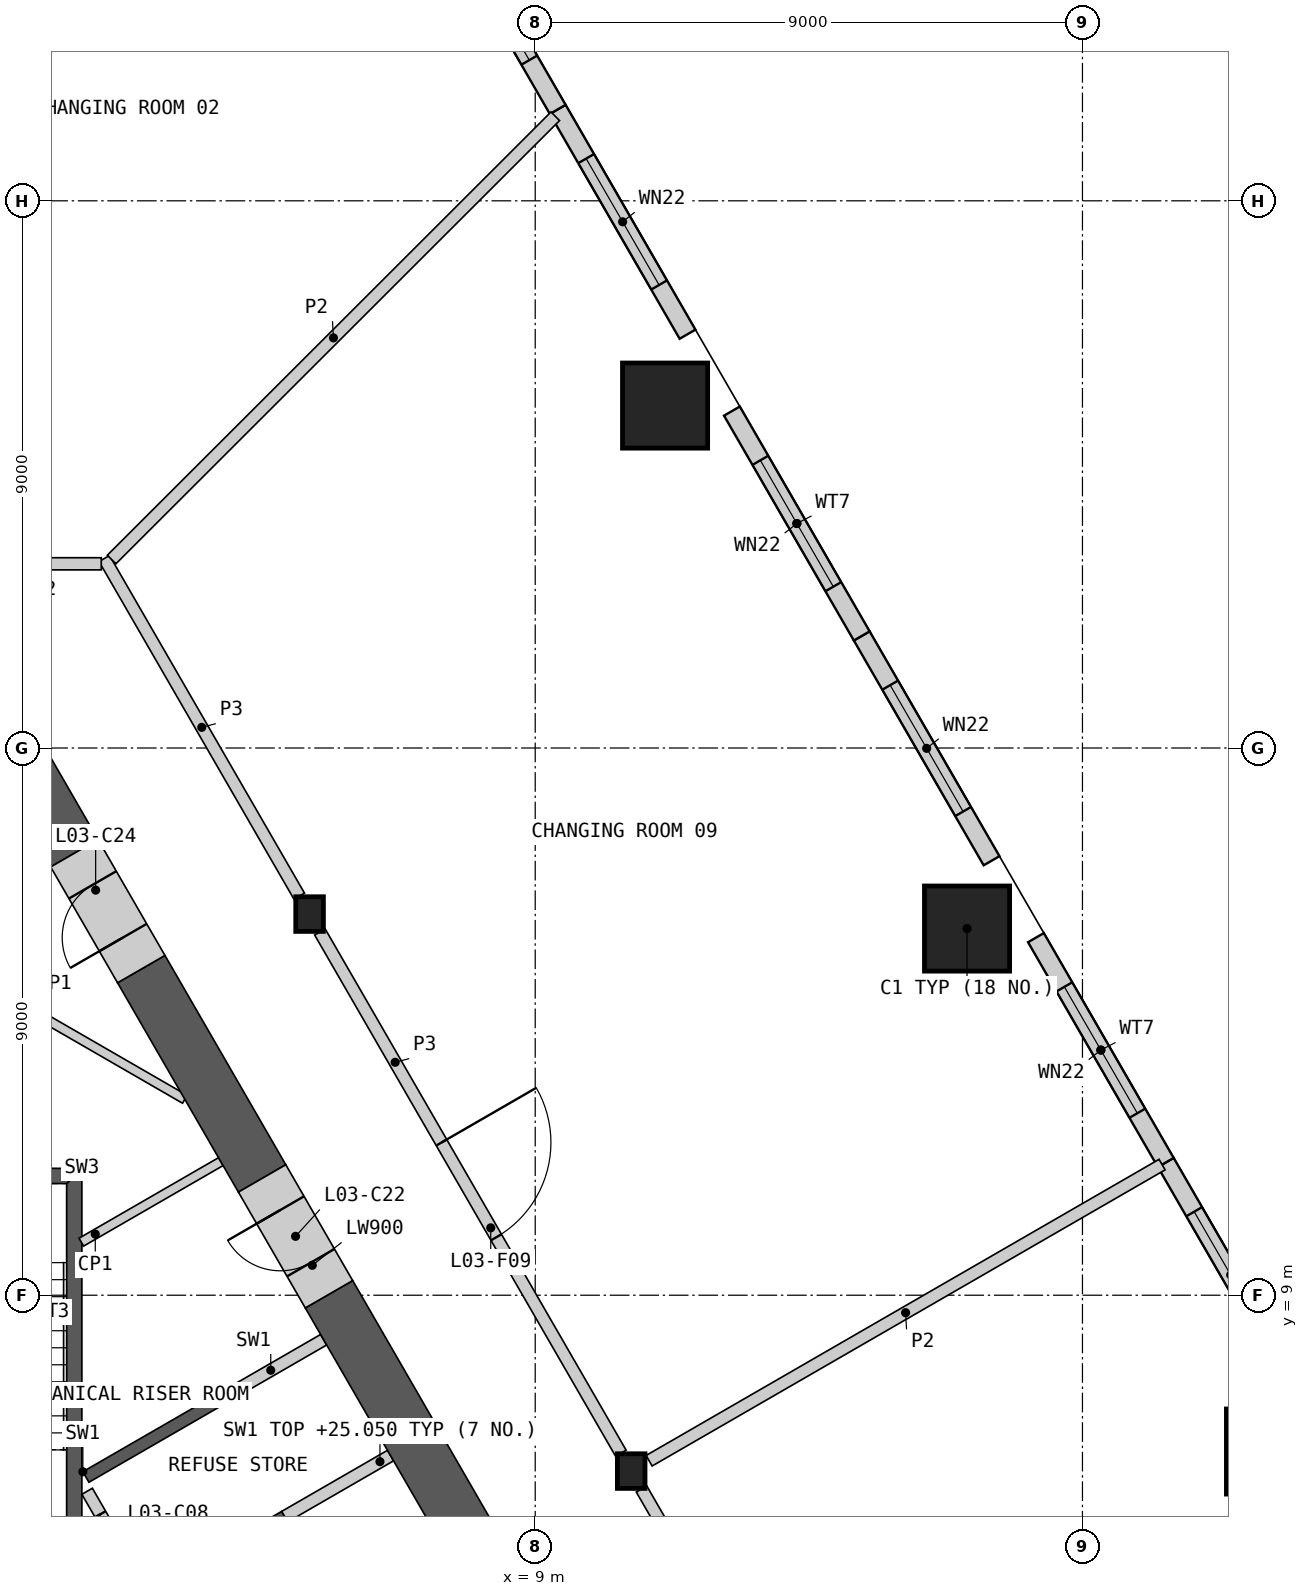
"""IFC4 building model, lengths in metres.
Left out: names, types, materials, properties, quantities, classifications, styles, units other than length and angle.
Written with IfcOpenShell. Run it as: python <this file> out.ifc"""

import sys

from ifc_helpers import new_model, si_unit, direction, frame, frame_2d, origin, origin_2d, place, context, subcontext, project, spatial, polyline, rectangle, hollow_rectangle, i_section, outline, extrude, element, fill, save


model = new_model("IFC4")
c1 = context("Model", 3, precision=1e-05, world=origin(), true_north=direction((0.0, 1.0)))
c2 = subcontext(c1, "Body", "Model", "MODEL_VIEW")
j1 = project(units=[si_unit("LENGTHUNIT", "METRE"), si_unit("PLANEANGLEUNIT", "RADIAN")], contexts=[c1])
p1 = place(None, origin())
s1 = spatial("IfcSite", under=j1, at=p1, CompositionType="ELEMENT")
p2 = place(p1, origin())
s2 = spatial("IfcBuilding", under=s1, at=p2, CompositionType="ELEMENT")
p3 = place(p2, frame((0.0, 0.0, 21.0)))
s3 = spatial("IfcBuildingStorey", under=s2, at=p3, CompositionType="ELEMENT", Elevation=21.0)
for number, where, z_axis, x_axis in (
    (1, (21.068, 6.429, 0.0), (0.0, 0.0, 1.0), (1.0, 0.0, 0.0)),
    (2, (16.102, 15.031, 0.0), (0.0, 0.0, 1.0), (1.0, 0.0, 0.0)),
    (3, (11.136, 23.632, 0.0), (0.0, 0.0, 1.0), (1.0, 0.0, 0.0)),
):
    element("IfcColumn", number, at=place(p3, frame(where, z_axis=z_axis, x_axis=x_axis)), inside=s3, PredefinedType="COLUMN", context=c2, shape_type="SweptSolid", body=[
        extrude(hollow_rectangle(XDim=1.4, YDim=1.4, WallThickness=0.1, at=origin_2d()), origin(), (0.0, 0.0, 1.0), 4.5),
    ])
for number, where, z_axis, x_axis in (
    (4, (10.578, 6.107, 0.0), (0.0, 0.0, 1.0), (1.0, 0.0, 0.0)),
    (5, (5.289, 15.269, 0.0), (0.0, 0.0, 1.0), (1.0, 0.0, 0.0)),
):
    element("IfcColumn", number, at=place(p3, frame(where, z_axis=z_axis, x_axis=x_axis)), inside=s3, PredefinedType="COLUMN", context=c2, shape_type="SweptSolid", body=[
        extrude(i_section(OverallWidth=0.454, OverallDepth=0.57, WebThickness=0.078, FlangeThickness=0.125, at=origin_2d()), origin(), (0.0, 0.0, 1.0), 4.5),
    ])
p4 = place(p3, frame((21.676, 7.189, 0.0), z_axis=(0.0, 0.0, 1.0), x_axis=(-0.499982117899, 0.866035727774, 0.0)))
e6 = element("IfcWall", 6, at=p4, inside=s3, PredefinedType="SOLIDWALL", context=c2, shape_type="SweptSolid", body=[
    extrude(rectangle(XDim=4.612, YDim=0.3, at=frame_2d((2.306, 0.0))), origin(), (0.0, 0.0, 1.0), 4.05),
])
p5 = place(p4, frame((1.277, 0.0, 0.9)))
e7 = element("IfcOpeningElement", 7, at=p5, cuts=e6, PredefinedType="OPENING", context=c2, shape_type="SweptSolid", body=[
    extrude(rectangle(XDim=2.4, YDim=2.55, at=frame_2d((1.2, 1.275))), frame((0.0, 0.16, 0.0), z_axis=(0.0, -1.0, 0.0), x_axis=(1.0, 0.0, 0.0)), (0.0, 0.0, 1.0), 0.32),
])
p6 = place(p3, frame((19.37, 11.183, 0.0), z_axis=(0.0, 0.0, 1.0), x_axis=(-0.499994660107, 0.866028486751, 0.0)))
e8 = element("IfcWall", 8, at=p6, inside=s3, PredefinedType="SOLIDWALL", context=c2, shape_type="SweptSolid", body=[
    extrude(rectangle(XDim=4.27, YDim=0.3, at=frame_2d((2.135, 0.0))), origin(), (0.0, 0.0, 1.0), 4.05),
])
p7 = place(p6, frame((0.935, 0.0, 0.9)))
e9 = element("IfcOpeningElement", 9, at=p7, cuts=e8, PredefinedType="OPENING", context=c2, shape_type="SweptSolid", body=[
    extrude(rectangle(XDim=2.4, YDim=2.55, at=frame_2d((1.2, 1.275))), frame((0.0, 0.16, 0.0), z_axis=(0.0, -1.0, 0.0), x_axis=(1.0, 0.0, 0.0)), (0.0, 0.0, 1.0), 0.32),
])
p8 = place(p3, frame((16.505, 16.146, 0.0), z_axis=(0.0, 0.0, 1.0), x_axis=(-0.500019418418, 0.866014192265, 0.0)))
e10 = element("IfcWall", 10, at=p8, inside=s3, PredefinedType="SOLIDWALL", context=c2, shape_type="SweptSolid", body=[
    extrude(rectangle(XDim=4.27, YDim=0.3, at=frame_2d((2.135, 0.0))), origin(), (0.0, 0.0, 1.0), 4.05),
])
p9 = place(p8, frame((0.935, 0.0, 0.9)))
e11 = element("IfcOpeningElement", 11, at=p9, cuts=e10, PredefinedType="OPENING", context=c2, shape_type="SweptSolid", body=[
    extrude(rectangle(XDim=2.4, YDim=2.55, at=frame_2d((1.2, 1.275))), frame((0.0, 0.16, 0.0), z_axis=(0.0, -1.0, 0.0), x_axis=(1.0, 0.0, 0.0)), (0.0, 0.0, 1.0), 0.32),
])
p10 = place(p3, frame((14.37, 19.844, 0.0), z_axis=(0.0, 0.0, 1.0), x_axis=(-0.499994660107, 0.866028486751, 0.0)))
e12 = element("IfcWall", 12, at=p10, inside=s3, PredefinedType="SOLIDWALL", context=c2, shape_type="SweptSolid", body=[
    extrude(rectangle(XDim=4.27, YDim=0.3, at=frame_2d((2.135, 0.0))), origin(), (0.0, 0.0, 1.0), 4.05),
])
p11 = place(p10, frame((0.935, 0.0, 0.9)))
e13 = element("IfcOpeningElement", 13, at=p11, cuts=e12, PredefinedType="OPENING", context=c2, shape_type="SweptSolid", body=[
    extrude(rectangle(XDim=2.4, YDim=2.55, at=frame_2d((1.2, 1.275))), frame((0.0, 0.16, 0.0), z_axis=(0.0, -1.0, 0.0), x_axis=(1.0, 0.0, 0.0)), (0.0, 0.0, 1.0), 0.32),
])
p12 = place(p3, frame((11.505, 24.806, 0.0), z_axis=(0.0, 0.0, 1.0), x_axis=(-0.499994660107, 0.866028486751, 0.0)))
e14 = element("IfcWall", 14, at=p12, inside=s3, PredefinedType="SOLIDWALL", context=c2, shape_type="SweptSolid", body=[
    extrude(rectangle(XDim=4.27, YDim=0.3, at=frame_2d((2.135, 0.0))), origin(), (0.0, 0.0, 1.0), 4.05),
])
p13 = place(p12, frame((0.935, 0.0, 0.9)))
e15 = element("IfcOpeningElement", 15, at=p13, cuts=e14, PredefinedType="OPENING", context=c2, shape_type="SweptSolid", body=[
    extrude(rectangle(XDim=2.4, YDim=2.55, at=frame_2d((1.2, 1.275))), frame((0.0, 0.16, 0.0), z_axis=(0.0, -1.0, 0.0), x_axis=(1.0, 0.0, 0.0)), (0.0, 0.0, 1.0), 0.32),
])
p14 = place(p3, frame((9.37, 28.504, 0.0), z_axis=(0.0, 0.0, 1.0), x_axis=(-0.500019418418, 0.866014192265, 0.0)))
e16 = element("IfcWall", 16, at=p14, inside=s3, PredefinedType="SOLIDWALL", context=c2, shape_type="SweptSolid", body=[
    extrude(rectangle(XDim=4.27, YDim=0.3, at=frame_2d((2.135, 0.0))), origin(), (0.0, 0.0, 1.0), 4.05),
])
p15 = place(p14, frame((0.935, 0.0, 0.9)))
e17 = element("IfcOpeningElement", 17, at=p15, cuts=e16, PredefinedType="OPENING", context=c2, shape_type="SweptSolid", body=[
    extrude(rectangle(XDim=2.4, YDim=2.55, at=frame_2d((1.2, 1.275))), frame((0.0, 0.16, 0.0), z_axis=(0.0, -1.0, 0.0), x_axis=(1.0, 0.0, 0.0)), (0.0, 0.0, 1.0), 0.32),
])
p16 = place(p3, origin())
e18 = element("IfcWall", 18, at=p16, inside=s3, PredefinedType="SHEAR", context=c2, shape_type="SweptSolid", body=[
    extrude(outline(polyline([(1.561, 6.097), (3.731, 7.35), (3.831, 7.177), (1.66, 5.924), (1.561, 6.097)])), origin(), (0.0, 0.0, 1.0), 4.05),
])
p17 = place(p3, origin())
e19 = element("IfcWall", 19, at=p17, inside=s3, PredefinedType="SHEAR", context=c2, shape_type="SweptSolid", body=[
    extrude(outline(polyline([(2.66, 4.192), (4.831, 5.445), (8.231, -0.444), (6.061, -1.697), (5.96, -1.524), (7.952, -0.374), (6.952, 1.358), (4.96, 0.208), (4.861, 0.381), (6.852, 1.531), (5.852, 3.263), (3.861, 2.113), (3.76, 2.287), (5.752, 3.437), (4.752, 5.169), (2.76, 4.019), (2.66, 4.192)])), origin(), (0.0, 0.0, 1.0), 4.05),
])
p18 = place(p3, frame((5.817, -1.476, 0.0), z_axis=(0.0, 0.0, 1.0), x_axis=(-0.500002616675, 0.866023893041, 0.0)))
e20 = element("IfcWall", 20, at=p18, inside=s3, PredefinedType="SOLIDWALL", context=c2, shape_type="SweptSolid", body=[
    extrude(rectangle(XDim=8.373, YDim=0.2, at=frame_2d((4.187, 0.0))), origin(), (0.0, 0.0, 1.0), 4.05),
])
p19 = place(p18, frame((0.337, 0.0, 0.0)))
e21 = element("IfcOpeningElement", 21, at=p19, cuts=e20, PredefinedType="OPENING", context=c2, shape_type="SweptSolid", body=[
    extrude(rectangle(XDim=1.1, YDim=2.1, at=frame_2d((0.55, 1.05))), frame((0.0, 0.11, 0.0), z_axis=(0.0, -1.0, 0.0), x_axis=(1.0, 0.0, 0.0)), (0.0, 0.0, 1.0), 0.22),
])
p20 = place(p18, frame((2.537, 0.0, 0.0)))
e22 = element("IfcOpeningElement", 22, at=p20, cuts=e20, PredefinedType="OPENING", context=c2, shape_type="SweptSolid", body=[
    extrude(rectangle(XDim=1.1, YDim=2.1, at=frame_2d((0.55, 1.05))), frame((0.0, 0.11, 0.0), z_axis=(0.0, -1.0, 0.0), x_axis=(1.0, 0.0, 0.0)), (0.0, 0.0, 1.0), 0.22),
])
p21 = place(p18, frame((4.737, 0.0, 0.0)))
e23 = element("IfcOpeningElement", 23, at=p21, cuts=e20, PredefinedType="OPENING", context=c2, shape_type="SweptSolid", body=[
    extrude(rectangle(XDim=1.1, YDim=2.1, at=frame_2d((0.55, 1.05))), frame((0.0, 0.11, 0.0), z_axis=(0.0, -1.0, 0.0), x_axis=(1.0, 0.0, 0.0)), (0.0, 0.0, 1.0), 0.22),
])
p22 = place(p18, frame((7.037, 0.0, 0.0)))
e24 = element("IfcOpeningElement", 24, at=p22, cuts=e20, PredefinedType="OPENING", context=c2, shape_type="SweptSolid", body=[
    extrude(rectangle(XDim=0.9, YDim=2.1, at=frame_2d((0.45, 1.05))), frame((0.0, 0.11, 0.0), z_axis=(0.0, -1.0, 0.0), x_axis=(1.0, 0.0, 0.0)), (0.0, 0.0, 1.0), 0.22),
])
p23 = place(p3, frame((4.881, 5.358, 0.0), z_axis=(0.0, 0.0, 1.0), x_axis=(0.866035824272, 0.499981950752, 0.0)))
e25 = element("IfcWall", 25, at=p23, inside=s3, PredefinedType="SHEAR", context=c2, shape_type="SweptSolid", body=[
    extrude(rectangle(XDim=2.009, YDim=0.2, at=frame_2d((1.004, 0.0))), origin(), (0.0, 0.0, 1.0), 4.05),
])
p24 = place(p3, frame((3.781, 7.263, 0.0), z_axis=(0.0, 0.0, 1.0), x_axis=(0.865983199114, 0.50007309351, 0.0)))
e26 = element("IfcWall", 26, at=p24, inside=s3, PredefinedType="SHEAR", context=c2, shape_type="SweptSolid", body=[
    extrude(rectangle(XDim=2.009, YDim=0.2, at=frame_2d((1.004, 0.0))), origin(), (0.0, 0.0, 1.0), 4.05),
])
p25 = place(p3, origin())
e27 = element("IfcWall", 27, at=p25, inside=s3, PredefinedType="SHEAR", context=c2, shape_type="SweptSolid", body=[
    extrude(outline(polyline([(1.544, 5.237), (1.544, 11.087), (1.294, 10.837), (1.294, 5.237), (1.544, 5.237)])), origin(), (0.0, 0.0, 1.0), 4.05),
])
p26 = place(p3, origin())
e28 = element("IfcWall", 28, at=p26, inside=s3, PredefinedType="SHEAR", context=c2, shape_type="SweptSolid", body=[
    extrude(outline(polyline([(1.544, 11.087), (-1.544, 11.087), (-1.294, 10.837), (1.294, 10.837), (1.544, 11.087)])), origin(), (0.0, 0.0, 1.0), 4.05),
])
p27 = place(p3, frame((3.829, 11.197, 0.0), z_axis=(0.0, 0.0, 1.0), x_axis=(-0.866016748302, -0.500014991436, 0.0)))
e29 = element("IfcWall", 29, at=p27, inside=s3, PredefinedType="PARTITIONING", context=c2, shape_type="SweptSolid", body=[
    extrude(rectangle(XDim=2.649, YDim=0.15, at=frame_2d((1.324, 0.0))), origin(), (0.0, 0.0, 1.0), 4.05),
])
p28 = place(p3, frame((-1.619, 15.026, 0.0), z_axis=(0.0, 0.0, 1.0), x_axis=(0.866015917575, -0.500016430238, 0.0)))
e30 = element("IfcWall", 30, at=p28, inside=s3, PredefinedType="PARTITIONING", context=c2, shape_type="SweptSolid", body=[
    extrude(rectangle(XDim=5.607, YDim=0.15, at=frame_2d((2.804, 0.0))), origin(), (0.0, 0.0, 1.0), 4.05),
])
p29 = place(p3, frame((9.561, 2.169, 0.0), z_axis=(0.0, 0.0, 1.0), x_axis=(-0.499995114243, 0.866028224559, 0.0)))
e31 = element("IfcWall", 31, at=p29, inside=s3, PredefinedType="SHEAR", context=c2, shape_type="SweptSolid", body=[
    extrude(rectangle(XDim=7.906, YDim=0.9, at=frame_2d((3.953, 0.0))), origin(), (0.0, 0.0, 1.0), 4.05),
])
p30 = place(p3, frame((4.509, 10.921, 0.0), z_axis=(0.0, 0.0, 1.0), x_axis=(-0.49999004381, 0.866031151917, 0.0)))
e32 = element("IfcWall", 32, at=p30, inside=s3, PredefinedType="SHEAR", context=c2, shape_type="SweptSolid", body=[
    extrude(rectangle(XDim=3.975, YDim=0.9, at=frame_2d((1.988, 0.0))), origin(), (0.0, 0.0, 1.0), 4.05),
])
p31 = place(p3, frame((1.421, 16.269, 0.0), z_axis=(0.0, 0.0, 1.0), x_axis=(-0.500009360108, 0.866019999656, 0.0)))
e33 = element("IfcWall", 33, at=p31, inside=s3, PredefinedType="SHEAR", context=c2, shape_type="SweptSolid", body=[
    extrude(rectangle(XDim=2.062, YDim=0.9, at=frame_2d((1.031, 0.0))), origin(), (0.0, 0.0, 1.0), 4.05),
])
p32 = place(p3, frame((5.608, 9.016, 0.0), z_axis=(0.0, 0.0, 1.0), x_axis=(-0.499994660107, 0.866028486751, 0.0)))
e34 = element("IfcWall", 34, at=p32, inside=s3, PredefinedType="SHEAR", context=c2, shape_type="SweptSolid", body=[
    extrude(rectangle(XDim=2.2, YDim=0.9, at=frame_2d((1.1, 0.0))), origin(), (0.0, 0.0, 1.0), 4.05),
])
p33 = place(p32, frame((0.6, 0.0, 0.0)))
e35 = element("IfcOpeningElement", 35, at=p33, cuts=e34, PredefinedType="OPENING", context=c2, shape_type="SweptSolid", body=[
    extrude(rectangle(XDim=1.0, YDim=2.1, at=frame_2d((0.5, 1.05))), frame((0.0, 0.46, 0.0), z_axis=(0.0, -1.0, 0.0), x_axis=(1.0, 0.0, 0.0)), (0.0, 0.0, 1.0), 0.92),
])
p34 = place(p3, frame((2.521, 14.364, 0.0), z_axis=(0.0, 0.0, 1.0), x_axis=(-0.50002983664, 0.866008176907, 0.0)))
e36 = element("IfcWall", 36, at=p34, inside=s3, PredefinedType="SHEAR", context=c2, shape_type="SweptSolid", body=[
    extrude(rectangle(XDim=2.2, YDim=0.9, at=frame_2d((1.1, 0.0))), origin(), (0.0, 0.0, 1.0), 4.05),
])
p35 = place(p34, frame((0.6, 0.0, 0.0)))
e37 = element("IfcOpeningElement", 37, at=p35, cuts=e36, PredefinedType="OPENING", context=c2, shape_type="SweptSolid", body=[
    extrude(rectangle(XDim=1.0, YDim=2.1, at=frame_2d((0.5, 1.05))), frame((0.0, 0.46, 0.0), z_axis=(0.0, -1.0, 0.0), x_axis=(1.0, 0.0, 0.0)), (0.0, 0.0, 1.0), 0.92),
])
p36 = place(p3, frame((5.459, 14.974, 0.0), z_axis=(0.0, 0.0, 1.0), x_axis=(0.499985793049, -0.866033606016, 0.0)))
e38 = element("IfcWall", 38, at=p36, inside=s3, PredefinedType="PARTITIONING", context=c2, shape_type="SweptSolid", body=[
    extrude(rectangle(XDim=9.898, YDim=0.2, at=frame_2d((4.949, 0.0))), origin(), (0.0, 0.0, 1.0), 4.05),
])
p37 = place(p36, frame((3.998, 0.0, 0.0)))
e39 = element("IfcOpeningElement", 39, at=p37, cuts=e38, PredefinedType="OPENING", context=c2, shape_type="SweptSolid", body=[
    extrude(rectangle(XDim=1.8, YDim=2.1, at=frame_2d((0.9, 1.05))), frame((0.0, 0.11, 0.0), z_axis=(0.0, -1.0, 0.0), x_axis=(1.0, 0.0, 0.0)), (0.0, 0.0, 1.0), 0.22),
])
p38 = place(p3, frame((10.749, 5.813, 0.0), z_axis=(0.0, 0.0, 1.0), x_axis=(0.500017363087, -0.866015378969, 0.0)))
e40 = element("IfcWall", 40, at=p38, inside=s3, PredefinedType="PARTITIONING", context=c2, shape_type="SweptSolid", body=[
    extrude(rectangle(XDim=9.77, YDim=0.2, at=frame_2d((4.885, 0.0))), origin(), (0.0, 0.0, 1.0), 4.05),
])
p39 = place(p38, frame((3.884, 0.0, 0.0)))
e41 = element("IfcOpeningElement", 41, at=p39, cuts=e40, PredefinedType="OPENING", context=c2, shape_type="SweptSolid", body=[
    extrude(rectangle(XDim=1.8, YDim=2.1, at=frame_2d((0.9, 1.05))), frame((0.0, 0.11, 0.0), z_axis=(0.0, -1.0, 0.0), x_axis=(1.0, 0.0, 0.0)), (0.0, 0.0, 1.0), 0.22),
])
p40 = place(p3, frame((1.913, 21.116, 0.0), z_axis=(0.0, 0.0, 1.0), x_axis=(0.500004801114, -0.866022631842, 0.0)))
e42 = element("IfcWall", 42, at=p40, inside=s3, PredefinedType="PARTITIONING", context=c2, shape_type="SweptSolid", body=[
    extrude(rectangle(XDim=6.412, YDim=0.2, at=frame_2d((3.206, 0.0))), origin(), (0.0, 0.0, 1.0), 4.05),
])
p41 = place(p3, frame((-1.863, 21.03, 0.0), z_axis=(0.0, 0.0, 1.0), x_axis=(1.0, 0.0, 0.0)))
e43 = element("IfcWall", 43, at=p41, inside=s3, PredefinedType="PARTITIONING", context=c2, shape_type="SweptSolid", body=[
    extrude(rectangle(XDim=3.726, YDim=0.2, at=frame_2d((1.863, 0.0))), origin(), (0.0, 0.0, 1.0), 4.05),
])
p42 = place(p41, frame((0.963, 0.0, 0.0)))
e44 = element("IfcOpeningElement", 44, at=p42, cuts=e43, PredefinedType="OPENING", context=c2, shape_type="SweptSolid", body=[
    extrude(rectangle(XDim=1.8, YDim=2.1, at=frame_2d((0.9, 1.05))), frame((0.0, 0.11, 0.0), z_axis=(0.0, -1.0, 0.0), x_axis=(1.0, 0.0, 0.0)), (0.0, 0.0, 1.0), 0.22),
])
p43 = place(p3, frame((2.034, 21.101, 0.0), z_axis=(0.0, 0.0, 1.0), x_axis=(0.707402604593, 0.706810833968, 0.0)))
e45 = element("IfcWall", 45, at=p43, inside=s3, PredefinedType="PARTITIONING", context=c2, shape_type="SweptSolid", body=[
    extrude(rectangle(XDim=10.314, YDim=0.2, at=frame_2d((5.157, 0.0))), origin(), (0.0, 0.0, 1.0), 4.05),
])
p44 = place(p3, frame((10.873, 6.278, 0.0), z_axis=(0.0, 0.0, 1.0), x_axis=(0.866029077831, 0.499993636311, 0.0)))
e46 = element("IfcWall", 46, at=p44, inside=s3, PredefinedType="PARTITIONING", context=c2, shape_type="SweptSolid", body=[
    extrude(rectangle(XDim=9.741, YDim=0.2, at=frame_2d((4.871, 0.0))), origin(), (0.0, 0.0, 1.0), 4.05),
])
p45 = place(p5, origin())
e47 = element("IfcWindow", 47, at=p45, inside=s3, PartitioningType="SINGLE_PANEL", PredefinedType="WINDOW", context=c2, shape_type="SweptSolid", body=[
    extrude(rectangle(XDim=2.4, YDim=2.55, at=frame_2d((1.2, 1.275))), frame((0.0, 0.03, 0.0), z_axis=(0.0, -1.0, 0.0), x_axis=(1.0, 0.0, 0.0)), (0.0, 0.0, 1.0), 0.06),
])
fill(e7, e47)
p46 = place(p7, origin())
e48 = element("IfcWindow", 48, at=p46, inside=s3, PartitioningType="SINGLE_PANEL", PredefinedType="WINDOW", context=c2, shape_type="SweptSolid", body=[
    extrude(rectangle(XDim=2.4, YDim=2.55, at=frame_2d((1.2, 1.275))), frame((0.0, 0.03, 0.0), z_axis=(0.0, -1.0, 0.0), x_axis=(1.0, 0.0, 0.0)), (0.0, 0.0, 1.0), 0.06),
])
fill(e9, e48)
p47 = place(p9, origin())
e49 = element("IfcWindow", 49, at=p47, inside=s3, PartitioningType="SINGLE_PANEL", PredefinedType="WINDOW", context=c2, shape_type="SweptSolid", body=[
    extrude(rectangle(XDim=2.4, YDim=2.55, at=frame_2d((1.2, 1.275))), frame((0.0, 0.03, 0.0), z_axis=(0.0, -1.0, 0.0), x_axis=(1.0, 0.0, 0.0)), (0.0, 0.0, 1.0), 0.06),
])
fill(e11, e49)
p48 = place(p11, origin())
e50 = element("IfcWindow", 50, at=p48, inside=s3, PartitioningType="SINGLE_PANEL", PredefinedType="WINDOW", context=c2, shape_type="SweptSolid", body=[
    extrude(rectangle(XDim=2.4, YDim=2.55, at=frame_2d((1.2, 1.275))), frame((0.0, 0.03, 0.0), z_axis=(0.0, -1.0, 0.0), x_axis=(1.0, 0.0, 0.0)), (0.0, 0.0, 1.0), 0.06),
])
fill(e13, e50)
p49 = place(p13, origin())
e51 = element("IfcWindow", 51, at=p49, inside=s3, PartitioningType="SINGLE_PANEL", PredefinedType="WINDOW", context=c2, shape_type="SweptSolid", body=[
    extrude(rectangle(XDim=2.4, YDim=2.55, at=frame_2d((1.2, 1.275))), frame((0.0, 0.03, 0.0), z_axis=(0.0, -1.0, 0.0), x_axis=(1.0, 0.0, 0.0)), (0.0, 0.0, 1.0), 0.06),
])
fill(e15, e51)
p50 = place(p15, origin())
e52 = element("IfcWindow", 52, at=p50, inside=s3, PartitioningType="SINGLE_PANEL", PredefinedType="WINDOW", context=c2, shape_type="SweptSolid", body=[
    extrude(rectangle(XDim=2.4, YDim=2.55, at=frame_2d((1.2, 1.275))), frame((0.0, 0.03, 0.0), z_axis=(0.0, -1.0, 0.0), x_axis=(1.0, 0.0, 0.0)), (0.0, 0.0, 1.0), 0.06),
])
fill(e17, e52)
p51 = place(p22, origin())
e53 = element("IfcDoor", 53, at=p51, inside=s3, OperationType="SINGLE_SWING_RIGHT", PredefinedType="DOOR", context=c2, shape_type="SweptSolid", body=[
    extrude(rectangle(XDim=0.9, YDim=2.1, at=frame_2d((0.45, 1.05))), frame((0.0, 0.025, 0.0), z_axis=(0.0, -1.0, 0.0), x_axis=(1.0, 0.0, 0.0)), (0.0, 0.0, 1.0), 0.05),
])
fill(e24, e53)
p52 = place(p33, origin())
e54 = element("IfcDoor", 54, at=p52, inside=s3, OperationType="SINGLE_SWING_RIGHT", PredefinedType="DOOR", context=c2, shape_type="SweptSolid", body=[
    extrude(rectangle(XDim=1.0, YDim=2.1, at=frame_2d((0.5, 1.05))), frame((0.0, 0.205, 0.0), z_axis=(0.0, -1.0, 0.0), x_axis=(1.0, 0.0, 0.0)), (0.0, 0.0, 1.0), 0.05),
])
fill(e35, e54)
p53 = place(p35, origin())
e55 = element("IfcDoor", 55, at=p53, inside=s3, OperationType="SINGLE_SWING_LEFT", PredefinedType="DOOR", context=c2, shape_type="SweptSolid", body=[
    extrude(rectangle(XDim=1.0, YDim=2.1, at=frame_2d((0.5, 1.05))), frame((0.0, 0.205, 0.0), z_axis=(0.0, -1.0, 0.0), x_axis=(1.0, 0.0, 0.0)), (0.0, 0.0, 1.0), 0.05),
])
fill(e37, e55)
p54 = place(p37, origin())
e56 = element("IfcDoor", 56, at=p54, inside=s3, OperationType="DOUBLE_DOOR_SINGLE_SWING", PredefinedType="DOOR", context=c2, shape_type="SweptSolid", body=[
    extrude(rectangle(XDim=1.8, YDim=2.1, at=frame_2d((0.9, 1.05))), frame((0.0, 0.025, 0.0), z_axis=(0.0, -1.0, 0.0), x_axis=(1.0, 0.0, 0.0)), (0.0, 0.0, 1.0), 0.05),
])
fill(e39, e56)
save(model, sys.argv[1])
